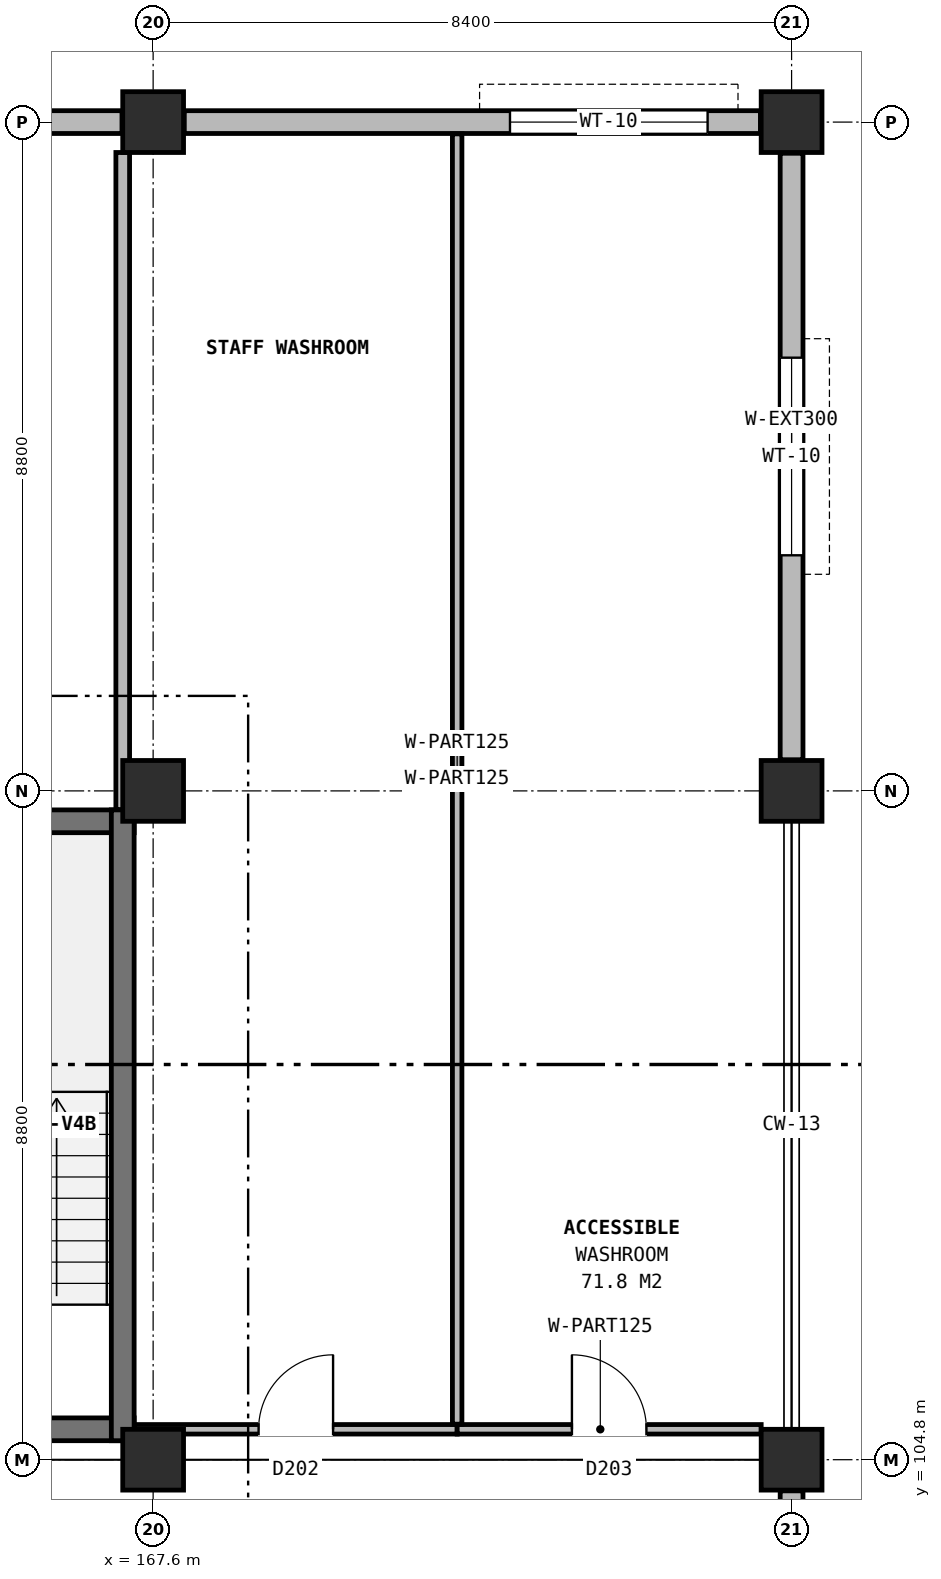
"""IFC4 building model, lengths in metres.
Left out: names, types, materials, properties, quantities, classifications, styles, units other than length and angle.
Written with IfcOpenShell. Run it as: python <this file> out.ifc"""

import sys

from ifc_helpers import new_model, si_unit, direction, frame, frame_2d, origin, origin_2d, place, context, subcontext, project, spatial, rectangle, extrude, element, fill, save


model = new_model("IFC4")
c1 = context("Model", 3, precision=1e-05, world=origin(), true_north=direction((0.0, 1.0)))
c2 = subcontext(c1, "Body", "Model", "MODEL_VIEW")
j1 = project(units=[si_unit("LENGTHUNIT", "METRE"), si_unit("PLANEANGLEUNIT", "RADIAN")], contexts=[c1])
p1 = place(None, origin())
s1 = spatial("IfcSite", under=j1, at=p1, CompositionType="ELEMENT")
p2 = place(p1, origin())
s2 = spatial("IfcBuilding", under=s1, at=p2, CompositionType="ELEMENT")
p3 = place(p2, frame((0.0, 0.0, 17.2)))
s3 = spatial("IfcBuildingStorey", under=s2, at=p3, CompositionType="ELEMENT", Elevation=17.2)
for number, where, z_axis, x_axis in (
    (1, (167.6, 104.8, 0.0), (0.0, 0.0, 1.0), (1.0, 0.0, 0.0)),
    (2, (167.6, 113.6, 0.0), (0.0, 0.0, 1.0), (1.0, 0.0, 0.0)),
    (3, (167.6, 122.4, 0.0), (0.0, 0.0, 1.0), (1.0, 0.0, 0.0)),
    (4, (176.0, 104.8, 0.0), (0.0, 0.0, 1.0), (1.0, 0.0, 0.0)),
    (5, (176.0, 113.6, 0.0), (0.0, 0.0, 1.0), (1.0, 0.0, 0.0)),
    (6, (176.0, 122.4, 0.0), (0.0, 0.0, 1.0), (1.0, 0.0, 0.0)),
):
    element("IfcColumn", number, at=place(p3, frame(where, z_axis=z_axis, x_axis=x_axis)), inside=s3, PredefinedType="COLUMN", context=c2, shape_type="SweptSolid", body=[
        extrude(rectangle(XDim=0.8, YDim=0.8, at=origin_2d()), origin(), (0.0, 0.0, 1.0), 3.8),
    ])
p4 = place(p3, frame((176.0, 96.41, 0.0), z_axis=(0.0, 0.0, 1.0), x_axis=(0.0, 1.0, 0.0)))
e7 = element("IfcWall", 7, at=p4, inside=s3, PredefinedType="SOLIDWALL", context=c2, shape_type="SweptSolid", body=[
    extrude(rectangle(XDim=7.98, YDim=0.3, at=frame_2d((3.99, 0.0))), origin(), (0.0, 0.0, 1.0), 3.05),
])
p5 = place(p4, frame((1.695, 0.0, 0.9)))
e8 = element("IfcOpeningElement", 8, at=p5, cuts=e7, PredefinedType="OPENING", context=c2, shape_type="SweptSolid", body=[
    extrude(rectangle(XDim=2.6, YDim=2.0, at=frame_2d((1.3, 1.0))), frame((0.0, 0.16, 0.0), z_axis=(0.0, -1.0, 0.0), x_axis=(1.0, 0.0, 0.0)), (0.0, 0.0, 1.0), 0.32),
])
p6 = place(p3, frame((176.0, 114.01, 0.0), z_axis=(0.0, 0.0, 1.0), x_axis=(0.0, 1.0, 0.0)))
e9 = element("IfcWall", 9, at=p6, inside=s3, PredefinedType="SOLIDWALL", context=c2, shape_type="SweptSolid", body=[
    extrude(rectangle(XDim=7.98, YDim=0.3, at=frame_2d((3.99, 0.0))), origin(), (0.0, 0.0, 1.0), 3.05),
])
p7 = place(p6, frame((2.69, 0.0, 0.9)))
e10 = element("IfcOpeningElement", 10, at=p7, cuts=e9, PredefinedType="OPENING", context=c2, shape_type="SweptSolid", body=[
    extrude(rectangle(XDim=2.6, YDim=2.0, at=frame_2d((1.3, 1.0))), frame((0.0, 0.16, 0.0), z_axis=(0.0, -1.0, 0.0), x_axis=(1.0, 0.0, 0.0)), (0.0, 0.0, 1.0), 0.32),
])
p8 = place(p3, frame((175.59, 122.4, 0.0), z_axis=(0.0, 0.0, 1.0), x_axis=(-1.0, 0.0, 0.0)))
e11 = element("IfcWall", 11, at=p8, inside=s3, PredefinedType="SOLIDWALL", context=c2, shape_type="SweptSolid", body=[
    extrude(rectangle(XDim=7.58, YDim=0.3, at=frame_2d((3.79, 0.0))), origin(), (0.0, 0.0, 1.0), 3.05),
])
p9 = place(p8, frame((0.695, 0.0, 0.9)))
e12 = element("IfcOpeningElement", 12, at=p9, cuts=e11, PredefinedType="OPENING", context=c2, shape_type="SweptSolid", body=[
    extrude(rectangle(XDim=2.6, YDim=2.0, at=frame_2d((1.3, 1.0))), frame((0.0, 0.16, 0.0), z_axis=(0.0, -1.0, 0.0), x_axis=(1.0, 0.0, 0.0)), (0.0, 0.0, 1.0), 0.32),
])
p10 = place(p3, frame((167.19, 122.4, 0.0), z_axis=(0.0, 0.0, 1.0), x_axis=(-1.0, 0.0, 0.0)))
e13 = element("IfcWall", 13, at=p10, inside=s3, PredefinedType="SOLIDWALL", context=c2, shape_type="SweptSolid", body=[
    extrude(rectangle(XDim=7.58, YDim=0.3, at=frame_2d((3.79, 0.0))), origin(), (0.0, 0.0, 1.0), 3.05),
])
p11 = place(p10, frame((2.49, 0.0, 0.9)))
e14 = element("IfcOpeningElement", 14, at=p11, cuts=e13, PredefinedType="OPENING", context=c2, shape_type="SweptSolid", body=[
    extrude(rectangle(XDim=2.6, YDim=2.0, at=frame_2d((1.3, 1.0))), frame((0.0, 0.16, 0.0), z_axis=(0.0, -1.0, 0.0), x_axis=(1.0, 0.0, 0.0)), (0.0, 0.0, 1.0), 0.32),
])
p12 = place(p3, frame((163.75, 105.2, 0.0), z_axis=(0.0, 0.0, 1.0), x_axis=(1.0, 0.0, 0.0)))
e15 = element("IfcWall", 15, at=p12, inside=s3, PredefinedType="SHEAR", context=c2, shape_type="SweptSolid", body=[
    extrude(rectangle(XDim=3.6, YDim=0.3, at=frame_2d((1.8, 0.0))), origin(), (0.0, 0.0, 1.0), 3.8),
])
p13 = place(p12, frame((1.05, 0.0, 0.0)))
e16 = element("IfcOpeningElement", 16, at=p13, cuts=e15, PredefinedType="OPENING", context=c2, shape_type="SweptSolid", body=[
    extrude(rectangle(XDim=1.1, YDim=2.2, at=frame_2d((0.55, 1.1))), frame((0.0, 0.16, 0.0), z_axis=(0.0, -1.0, 0.0), x_axis=(1.0, 0.0, 0.0)), (0.0, 0.0, 1.0), 0.32),
])
p14 = place(p3, frame((163.75, 113.2, 0.0), z_axis=(0.0, 0.0, 1.0), x_axis=(1.0, 0.0, 0.0)))
e17 = element("IfcWall", 17, at=p14, inside=s3, PredefinedType="SHEAR", context=c2, shape_type="SweptSolid", body=[
    extrude(rectangle(XDim=3.6, YDim=0.3, at=frame_2d((1.8, 0.0))), origin(), (0.0, 0.0, 1.0), 3.8),
])
p15 = place(p3, frame((167.2, 105.05, 0.0), z_axis=(0.0, 0.0, 1.0), x_axis=(0.0, 1.0, 0.0)))
e18 = element("IfcWall", 18, at=p15, inside=s3, PredefinedType="SHEAR", context=c2, shape_type="SweptSolid", body=[
    extrude(rectangle(XDim=8.3, YDim=0.3, at=frame_2d((4.15, 0.0))), origin(), (0.0, 0.0, 1.0), 3.8),
])
p16 = place(p3, frame((167.355, 105.2, 0.0), z_axis=(0.0, 0.0, 1.0), x_axis=(1.0, 0.0, 0.0)))
e19 = element("IfcWall", 19, at=p16, inside=s3, PredefinedType="PARTITIONING", context=c2, shape_type="SweptSolid", body=[
    extrude(rectangle(XDim=4.245, YDim=0.125, at=frame_2d((2.123, 0.0))), origin(), (0.0, 0.0, 1.0), 3.045),
])
p17 = place(p16, frame((1.633, 0.0, 0.0)))
e20 = element("IfcOpeningElement", 20, at=p17, cuts=e19, PredefinedType="OPENING", context=c2, shape_type="SweptSolid", body=[
    extrude(rectangle(XDim=0.98, YDim=2.1, at=frame_2d((0.49, 1.05))), frame((0.0, 0.073, 0.0), z_axis=(0.0, -1.0, 0.0), x_axis=(1.0, 0.0, 0.0)), (0.0, 0.0, 1.0), 0.145),
])
p18 = place(p3, frame((171.6, 105.2, 0.0), z_axis=(0.0, 0.0, 1.0), x_axis=(1.0, 0.0, 0.0)))
e21 = element("IfcWall", 21, at=p18, inside=s3, PredefinedType="PARTITIONING", context=c2, shape_type="SweptSolid", body=[
    extrude(rectangle(XDim=4.0, YDim=0.125, at=frame_2d((2.0, 0.0))), origin(), (0.0, 0.0, 1.0), 3.045),
])
p19 = place(p18, frame((1.51, 0.0, 0.0)))
e22 = element("IfcOpeningElement", 22, at=p19, cuts=e21, PredefinedType="OPENING", context=c2, shape_type="SweptSolid", body=[
    extrude(rectangle(XDim=0.98, YDim=2.1, at=frame_2d((0.49, 1.05))), frame((0.0, 0.073, 0.0), z_axis=(0.0, -1.0, 0.0), x_axis=(1.0, 0.0, 0.0)), (0.0, 0.0, 1.0), 0.145),
])
p20 = place(p3, frame((167.2, 113.355, 0.0), z_axis=(0.0, 0.0, 1.0), x_axis=(0.0, 1.0, 0.0)))
e23 = element("IfcWall", 23, at=p20, inside=s3, PredefinedType="PARTITIONING", context=c2, shape_type="SweptSolid", body=[
    extrude(rectangle(XDim=8.645, YDim=0.18, at=frame_2d((4.323, 0.0))), origin(), (0.0, 0.0, 1.0), 3.045),
])
p21 = place(p3, frame((171.6, 105.268, 0.0), z_axis=(0.0, 0.0, 1.0), x_axis=(0.0, 1.0, 0.0)))
e24 = element("IfcWall", 24, at=p21, inside=s3, PredefinedType="PARTITIONING", context=c2, shape_type="SweptSolid", body=[
    extrude(rectangle(XDim=16.978, YDim=0.125, at=frame_2d((8.489, 0.0))), origin(), (0.0, 0.0, 1.0), 3.465),
])
p22 = place(p7, origin())
e25 = element("IfcWindow", 25, at=p22, inside=s3, PartitioningType="SINGLE_PANEL", PredefinedType="WINDOW", context=c2, shape_type="SweptSolid", body=[
    extrude(rectangle(XDim=2.6, YDim=2.0, at=frame_2d((1.3, 1.0))), frame((0.0, 0.03, 0.0), z_axis=(0.0, -1.0, 0.0), x_axis=(1.0, 0.0, 0.0)), (0.0, 0.0, 1.0), 0.06),
])
fill(e10, e25)
p23 = place(p9, origin())
e26 = element("IfcWindow", 26, at=p23, inside=s3, PartitioningType="SINGLE_PANEL", PredefinedType="WINDOW", context=c2, shape_type="SweptSolid", body=[
    extrude(rectangle(XDim=2.6, YDim=2.0, at=frame_2d((1.3, 1.0))), frame((0.0, 0.03, 0.0), z_axis=(0.0, -1.0, 0.0), x_axis=(1.0, 0.0, 0.0)), (0.0, 0.0, 1.0), 0.06),
])
fill(e12, e26)
p24 = place(p17, origin())
e27 = element("IfcDoor", 27, at=p24, inside=s3, OperationType="SINGLE_SWING_RIGHT", PredefinedType="DOOR", context=c2, shape_type="SweptSolid", body=[
    extrude(rectangle(XDim=0.98, YDim=2.1, at=frame_2d((0.49, 1.05))), frame((0.0, 0.025, 0.0), z_axis=(0.0, -1.0, 0.0), x_axis=(1.0, 0.0, 0.0)), (0.0, 0.0, 1.0), 0.05),
])
fill(e20, e27)
p25 = place(p19, origin())
e28 = element("IfcDoor", 28, at=p25, inside=s3, OperationType="SINGLE_SWING_LEFT", PredefinedType="DOOR", context=c2, shape_type="SweptSolid", body=[
    extrude(rectangle(XDim=0.98, YDim=2.1, at=frame_2d((0.49, 1.05))), frame((0.0, 0.025, 0.0), z_axis=(0.0, -1.0, 0.0), x_axis=(1.0, 0.0, 0.0)), (0.0, 0.0, 1.0), 0.05),
])
fill(e22, e28)
save(model, sys.argv[1])
